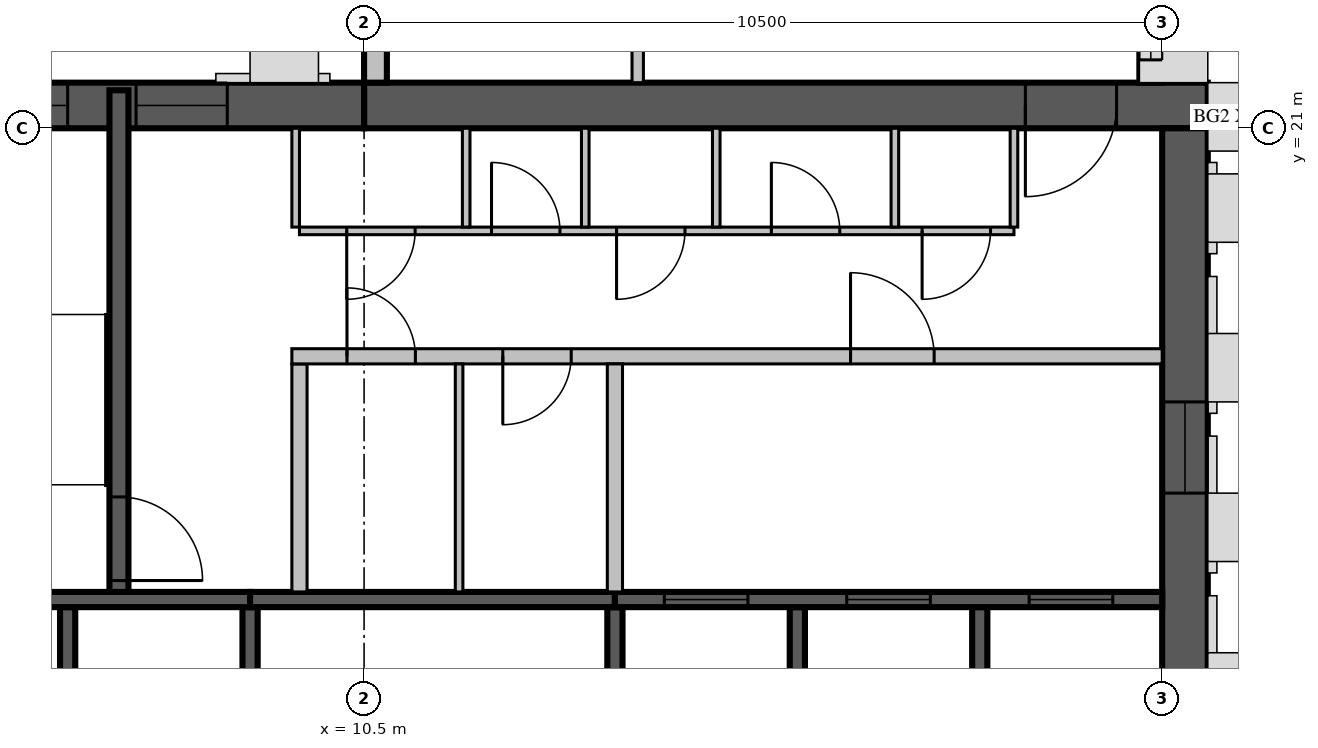
"""IFC4 building model, lengths in metres.
Left out: names, types, materials, properties, quantities, classifications, styles, units other than length and angle.
Written with IfcOpenShell. Run it as: python <this file> out.ifc"""

import sys

from ifc_helpers import new_model, si_unit, direction, frame, frame_2d, origin, place, context, subcontext, project, spatial, rectangle, extrude, source, transform, mapped, element, fill, save


model = new_model("IFC4")
c1 = context("Model", 3, precision=1e-05, world=origin(), true_north=direction((0.0, 1.0)))
c2 = subcontext(c1, "Body", "Model", "MODEL_VIEW")
j1 = project(units=[si_unit("LENGTHUNIT", "METRE"), si_unit("PLANEANGLEUNIT", "RADIAN")], contexts=[c1])
p1 = place(None, origin())
s1 = spatial("IfcSite", under=j1, at=p1, CompositionType="ELEMENT")
p2 = place(p1, origin())
s2 = spatial("IfcBuilding", under=s1, at=p2, CompositionType="ELEMENT")
p3 = place(p2, frame((0.0, 0.0, 302.0)))
s3 = spatial("IfcBuildingStorey", under=s2, at=p3, CompositionType="ELEMENT", Elevation=302.0)
m1 = source(origin(), c2, "Body", "SweptSolid", [
    extrude(rectangle(XDim=11.1, YDim=0.6, at=frame_2d((5.55, 0.0))), origin(), (0.0, 0.0, 1.0), 3.5),
])
p4 = place(p3, frame((10.5, 21.3, 0.0), z_axis=(0.0, 0.0, 1.0), x_axis=(1.0, 0.0, 0.0)))
e1 = element("IfcWall", 1, at=p4, inside=s3, PredefinedType="SHEAR", context=c2, shape_type="MappedRepresentation", body=[
    mapped(m1, transform((0.0, 0.0, 0.0), scale=1.0)),
])
m2 = source(origin(), c2, "Body", "SweptSolid", [
    extrude(rectangle(XDim=1.2, YDim=2.1, at=frame_2d((0.6, 1.05))), frame((0.0, 0.31, 0.0), z_axis=(0.0, -1.0, 0.0), x_axis=(1.0, 0.0, 0.0)), (0.0, 0.0, 1.0), 0.62),
])
p5 = place(p4, frame((8.7, 0.0, 0.0)))
e2 = element("IfcOpeningElement", 2, at=p5, cuts=e1, PredefinedType="OPENING", context=c2, shape_type="MappedRepresentation", body=[
    mapped(m2, transform((0.0, 0.0, 0.0), scale=1.0)),
])
m3 = source(origin(), c2, "Body", "SweptSolid", [
    extrude(rectangle(XDim=10.5, YDim=0.6, at=frame_2d((5.25, 0.0))), origin(), (0.0, 0.0, 1.0), 3.5),
])
p6 = place(p3, frame((21.3, 10.5, 0.0), z_axis=(0.0, 0.0, 1.0), x_axis=(0.0, 1.0, 0.0)))
e3 = element("IfcWall", 3, at=p6, inside=s3, PredefinedType="SHEAR", context=c2, shape_type="MappedRepresentation", body=[
    mapped(m3, transform((0.0, 0.0, 0.0), scale=1.0)),
])
m4 = source(origin(), c2, "Body", "SweptSolid", [
    extrude(rectangle(XDim=1.2, YDim=2.4, at=frame_2d((0.6, 1.2))), frame((0.0, 0.31, 0.0), z_axis=(0.0, -1.0, 0.0), x_axis=(1.0, 0.0, 0.0)), (0.0, 0.0, 1.0), 0.62),
])
p7 = place(p6, frame((5.7, 0.0, 0.6)))
e4 = element("IfcOpeningElement", 4, at=p7, cuts=e3, PredefinedType="OPENING", context=c2, shape_type="MappedRepresentation", body=[
    mapped(m4, transform((0.0, 0.0, 0.0), scale=1.0)),
])
m5 = source(origin(), c2, "Body", "SweptSolid", [
    extrude(rectangle(XDim=6.6, YDim=0.6, at=frame_2d((3.3, 0.0))), origin(), (0.0, 0.0, 1.0), 3.5),
])
p8 = place(p3, frame((3.9, 21.3, 0.0), z_axis=(0.0, 0.0, 1.0), x_axis=(1.0, 0.0, 0.0)))
e5 = element("IfcWall", 5, at=p8, inside=s3, PredefinedType="SHEAR", context=c2, shape_type="MappedRepresentation", body=[
    mapped(m5, transform((0.0, 0.0, 0.0), scale=1.0)),
])
p9 = place(p8, frame((1.5, 0.0, 0.6)))
e6 = element("IfcOpeningElement", 6, at=p9, cuts=e5, PredefinedType="OPENING", context=c2, shape_type="MappedRepresentation", body=[
    mapped(m4, transform((0.0, 0.0, 0.0), scale=1.0)),
])
p10 = place(p8, frame((3.6, 0.0, 0.6)))
e7 = element("IfcOpeningElement", 7, at=p10, cuts=e5, PredefinedType="OPENING", context=c2, shape_type="MappedRepresentation", body=[
    mapped(m4, transform((0.0, 0.0, 0.0), scale=1.0)),
])
m6 = source(origin(), c2, "Body", "SweptSolid", [
    extrude(rectangle(XDim=7.45, YDim=0.3, at=frame_2d((3.725, 0.0))), origin(), (0.0, 0.0, 1.0), 3.1),
])
p11 = place(p3, frame((20.85, 21.6, 0.0), z_axis=(0.0, 0.0, 1.0), x_axis=(0.0, 1.0, 0.0)))
e8 = element("IfcWall", 8, at=p11, inside=s3, PredefinedType="STANDARD", context=c2, shape_type="MappedRepresentation", body=[
    mapped(m6, transform((0.0, 0.0, 0.0), scale=1.0)),
])
m7 = source(origin(), c2, "Body", "SweptSolid", [
    extrude(rectangle(XDim=2.4, YDim=2.0, at=frame_2d((1.2, 1.0))), frame((0.0, 0.16, 0.0), z_axis=(0.0, -1.0, 0.0), x_axis=(1.0, 0.0, 0.0)), (0.0, 0.0, 1.0), 0.32),
])
p12 = place(p11, frame((0.3, 0.0, 0.6)))
e9 = element("IfcOpeningElement", 9, at=p12, cuts=e8, PredefinedType="OPENING", context=c2, shape_type="MappedRepresentation", body=[
    mapped(m7, transform((0.0, 0.0, 0.0), scale=1.0)),
])
m8 = source(origin(), c2, "Body", "SweptSolid", [
    extrude(rectangle(XDim=3.0, YDim=2.0, at=frame_2d((1.5, 1.0))), frame((0.0, 0.16, 0.0), z_axis=(0.0, -1.0, 0.0), x_axis=(1.0, 0.0, 0.0)), (0.0, 0.0, 1.0), 0.32),
])
p13 = place(p11, frame((4.2, 0.0, 0.6)))
e10 = element("IfcOpeningElement", 10, at=p13, cuts=e8, PredefinedType="OPENING", context=c2, shape_type="MappedRepresentation", body=[
    mapped(m8, transform((0.0, 0.0, 0.0), scale=1.0)),
])
m9 = source(origin(), c2, "Body", "SweptSolid", [
    extrude(rectangle(XDim=5.28, YDim=0.3, at=frame_2d((2.64, 0.0))), origin(), (0.0, 0.0, 1.0), 3.1),
])
p14 = place(p3, frame((10.65, 26.88, 0.0), z_axis=(0.0, 0.0, 1.0), x_axis=(0.0, -1.0, 0.0)))
e11 = element("IfcWall", 11, at=p14, inside=s3, PredefinedType="STANDARD", context=c2, shape_type="MappedRepresentation", body=[
    mapped(m9, transform((0.0, 0.0, 0.0), scale=1.0)),
])
m10 = source(origin(), c2, "Body", "SweptSolid", [
    extrude(rectangle(XDim=3.6, YDim=2.0, at=frame_2d((1.8, 1.0))), frame((0.0, 0.16, 0.0), z_axis=(0.0, -1.0, 0.0), x_axis=(1.0, 0.0, 0.0)), (0.0, 0.0, 1.0), 0.32),
])
p15 = place(p14, frame((1.14, 0.0, 0.6)))
e12 = element("IfcOpeningElement", 12, at=p15, cuts=e11, PredefinedType="OPENING", context=c2, shape_type="MappedRepresentation", body=[
    mapped(m10, transform((0.0, 0.0, 0.0), scale=1.0)),
])
m11 = source(origin(), c2, "Body", "SweptSolid", [
    extrude(rectangle(XDim=3.0, YDim=0.2, at=frame_2d((1.5, 0.0))), origin(), (0.0, 0.0, 1.0), 3.5),
])
p16 = place(p3, frame((6.6, 11.7, 0.0), z_axis=(0.0, 0.0, 1.0), x_axis=(0.0, 1.0, 0.0)))
e13 = element("IfcWall", 13, at=p16, inside=s3, PredefinedType="SOLIDWALL", context=c2, shape_type="MappedRepresentation", body=[
    mapped(m11, transform((0.0, 0.0, 0.0), scale=1.0)),
])
m12 = source(origin(), c2, "Body", "SweptSolid", [
    extrude(rectangle(XDim=3.0, YDim=0.2, at=frame_2d((1.5, 0.0))), origin(), (0.0, 0.0, 1.0), 3.1),
])
for number, where, z_axis, x_axis in (
    (14, (9.0, 11.7, 0.0), (0.0, 0.0, 1.0), (0.0, 1.0, 0.0)),
    (15, (13.8, 11.7, 0.0), (0.0, 0.0, 1.0), (0.0, 1.0, 0.0)),
):
    element("IfcWall", number, at=place(p3, frame(where, z_axis=z_axis, x_axis=x_axis)), inside=s3, PredefinedType="SOLIDWALL", context=c2, shape_type="MappedRepresentation", body=[
        mapped(m12, transform((0.0, 0.0, 0.0), scale=1.0)),
    ])
for number, where, z_axis, x_axis in (
    (16, (16.2, 11.7, 0.0), (0.0, 0.0, 1.0), (0.0, 1.0, 0.0)),
    (17, (18.6, 11.7, 0.0), (0.0, 0.0, 1.0), (0.0, 1.0, 0.0)),
):
    element("IfcWall", number, at=place(p3, frame(where, z_axis=z_axis, x_axis=x_axis)), inside=s3, PredefinedType="SOLIDWALL", context=c2, shape_type="MappedRepresentation", body=[
        mapped(m11, transform((0.0, 0.0, 0.0), scale=1.0)),
    ])
m13 = source(origin(), c2, "Body", "SweptSolid", [
    extrude(rectangle(XDim=4.8, YDim=0.2, at=frame_2d((2.4, 0.0))), origin(), (0.0, 0.0, 1.0), 3.5),
])
p17 = place(p3, frame((4.2, 14.8, 0.0), z_axis=(0.0, 0.0, 1.0), x_axis=(1.0, 0.0, 0.0)))
e18 = element("IfcWall", 18, at=p17, inside=s3, PredefinedType="SOLIDWALL", context=c2, shape_type="MappedRepresentation", body=[
    mapped(m13, transform((0.0, 0.0, 0.0), scale=1.0)),
])
m14 = source(origin(), c2, "Body", "SweptSolid", [
    extrude(rectangle(XDim=4.8, YDim=0.2, at=frame_2d((2.4, 0.0))), origin(), (0.0, 0.0, 1.0), 3.1),
])
p18 = place(p3, frame((9.0, 14.8, 0.0), z_axis=(0.0, 0.0, 1.0), x_axis=(1.0, 0.0, 0.0)))
e19 = element("IfcWall", 19, at=p18, inside=s3, PredefinedType="SOLIDWALL", context=c2, shape_type="MappedRepresentation", body=[
    mapped(m14, transform((0.0, 0.0, 0.0), scale=1.0)),
])
m15 = source(origin(), c2, "Body", "SweptSolid", [
    extrude(rectangle(XDim=7.2, YDim=0.2, at=frame_2d((3.6, 0.0))), origin(), (0.0, 0.0, 1.0), 3.5),
])
p19 = place(p3, frame((13.8, 14.8, 0.0), z_axis=(0.0, 0.0, 1.0), x_axis=(1.0, 0.0, 0.0)))
e20 = element("IfcWall", 20, at=p19, inside=s3, PredefinedType="SOLIDWALL", context=c2, shape_type="MappedRepresentation", body=[
    mapped(m15, transform((0.0, 0.0, 0.0), scale=1.0)),
])
m16 = source(origin(), c2, "Body", "SweptSolid", [
    extrude(rectangle(XDim=1.1, YDim=2.1, at=frame_2d((0.55, 1.05))), frame((0.0, 0.11, 0.0), z_axis=(0.0, -1.0, 0.0), x_axis=(1.0, 0.0, 0.0)), (0.0, 0.0, 1.0), 0.22),
])
p20 = place(p19, frame((0.65, 0.0, 0.0)))
e21 = element("IfcOpeningElement", 21, at=p20, cuts=e20, PredefinedType="OPENING", context=c2, shape_type="MappedRepresentation", body=[
    mapped(m16, transform((0.0, 0.0, 0.0), scale=1.0)),
])
p21 = place(p19, frame((3.05, 0.0, 0.0)))
e22 = element("IfcOpeningElement", 22, at=p21, cuts=e20, PredefinedType="OPENING", context=c2, shape_type="MappedRepresentation", body=[
    mapped(m16, transform((0.0, 0.0, 0.0), scale=1.0)),
])
p22 = place(p19, frame((5.45, 0.0, 0.0)))
e23 = element("IfcOpeningElement", 23, at=p22, cuts=e20, PredefinedType="OPENING", context=c2, shape_type="MappedRepresentation", body=[
    mapped(m16, transform((0.0, 0.0, 0.0), scale=1.0)),
])
m17 = source(origin(), c2, "Body", "SweptSolid", [
    extrude(rectangle(XDim=6.6, YDim=0.25, at=frame_2d((3.3, 0.0))), origin(), (0.0, 0.0, 1.0), 3.1),
])
p23 = place(p3, frame((7.275, 14.9, 0.0), z_axis=(0.0, 0.0, 1.0), x_axis=(0.0, 1.0, 0.0)))
e24 = element("IfcWall", 24, at=p23, inside=s3, PredefinedType="SOLIDWALL", context=c2, shape_type="MappedRepresentation", body=[
    mapped(m17, transform((0.0, 0.0, 0.0), scale=1.0)),
])
m18 = source(origin(), c2, "Body", "SweptSolid", [
    extrude(rectangle(XDim=1.1, YDim=2.1, at=frame_2d((0.55, 1.05))), frame((0.0, 0.135, 0.0), z_axis=(0.0, -1.0, 0.0), x_axis=(1.0, 0.0, 0.0)), (0.0, 0.0, 1.0), 0.27),
])
p24 = place(p23, frame((0.15, 0.0, 0.0)))
e25 = element("IfcOpeningElement", 25, at=p24, cuts=e24, PredefinedType="OPENING", context=c2, shape_type="MappedRepresentation", body=[
    mapped(m18, transform((0.0, 0.0, 0.0), scale=1.0)),
])
m19 = source(origin(), c2, "Body", "SweptSolid", [
    extrude(rectangle(XDim=3.0, YDim=0.2, at=frame_2d((1.5, 0.0))), origin(), (0.0, 0.0, 1.0), 3.1),
])
p25 = place(p3, frame((9.65, 14.9, 0.0), z_axis=(0.0, 0.0, 1.0), x_axis=(0.0, 1.0, 0.0)))
e26 = element("IfcWall", 26, at=p25, inside=s3, PredefinedType="PARTITIONING", context=c2, shape_type="MappedRepresentation", body=[
    mapped(m19, transform((0.0, 0.0, 0.0), scale=1.0)),
])
m20 = source(origin(), c2, "Body", "SweptSolid", [
    extrude(rectangle(XDim=11.45, YDim=0.2, at=frame_2d((5.725, 0.0))), origin(), (0.0, 0.0, 1.0), 3.1),
])
p26 = place(p3, frame((9.55, 18.0, 0.0), z_axis=(0.0, 0.0, 1.0), x_axis=(1.0, 0.0, 0.0)))
e27 = element("IfcWall", 27, at=p26, inside=s3, PredefinedType="PARTITIONING", context=c2, shape_type="MappedRepresentation", body=[
    mapped(m20, transform((0.0, 0.0, 0.0), scale=1.0)),
])
m21 = source(origin(), c2, "Body", "SweptSolid", [
    extrude(rectangle(XDim=0.9, YDim=2.1, at=frame_2d((0.45, 1.05))), frame((0.0, 0.11, 0.0), z_axis=(0.0, -1.0, 0.0), x_axis=(1.0, 0.0, 0.0)), (0.0, 0.0, 1.0), 0.22),
])
p27 = place(p26, frame((0.725, 0.0, 0.0)))
e28 = element("IfcOpeningElement", 28, at=p27, cuts=e27, PredefinedType="OPENING", context=c2, shape_type="MappedRepresentation", body=[
    mapped(m21, transform((0.0, 0.0, 0.0), scale=1.0)),
])
p28 = place(p26, frame((2.775, 0.0, 0.0)))
e29 = element("IfcOpeningElement", 29, at=p28, cuts=e27, PredefinedType="OPENING", context=c2, shape_type="MappedRepresentation", body=[
    mapped(m21, transform((0.0, 0.0, 0.0), scale=1.0)),
])
p29 = place(p26, frame((7.35, 0.0, 0.0)))
e30 = element("IfcOpeningElement", 30, at=p29, cuts=e27, PredefinedType="OPENING", context=c2, shape_type="MappedRepresentation", body=[
    mapped(m16, transform((0.0, 0.0, 0.0), scale=1.0)),
])
m22 = source(origin(), c2, "Body", "SweptSolid", [
    extrude(rectangle(XDim=9.4, YDim=0.1, at=frame_2d((4.7, 0.0))), origin(), (0.0, 0.0, 1.0), 3.1),
])
p30 = place(p3, frame((9.65, 19.65, 0.0), z_axis=(0.0, 0.0, 1.0), x_axis=(1.0, 0.0, 0.0)))
e31 = element("IfcWall", 31, at=p30, inside=s3, PredefinedType="PARTITIONING", context=c2, shape_type="MappedRepresentation", body=[
    mapped(m22, transform((0.0, 0.0, 0.0), scale=1.0)),
])
m23 = source(origin(), c2, "Body", "SweptSolid", [
    extrude(rectangle(XDim=0.9, YDim=2.1, at=frame_2d((0.45, 1.05))), frame((0.0, 0.06, 0.0), z_axis=(0.0, -1.0, 0.0), x_axis=(1.0, 0.0, 0.0)), (0.0, 0.0, 1.0), 0.12),
])
p31 = place(p30, frame((0.622, 0.0, 0.0)))
e32 = element("IfcOpeningElement", 32, at=p31, cuts=e31, PredefinedType="OPENING", context=c2, shape_type="MappedRepresentation", body=[
    mapped(m23, transform((0.0, 0.0, 0.0), scale=1.0)),
])
p32 = place(p30, frame((2.527, 0.0, 0.0)))
e33 = element("IfcOpeningElement", 33, at=p32, cuts=e31, PredefinedType="OPENING", context=c2, shape_type="MappedRepresentation", body=[
    mapped(m23, transform((0.0, 0.0, 0.0), scale=1.0)),
])
p33 = place(p30, frame((4.172, 0.0, 0.0)))
e34 = element("IfcOpeningElement", 34, at=p33, cuts=e31, PredefinedType="OPENING", context=c2, shape_type="MappedRepresentation", body=[
    mapped(m23, transform((0.0, 0.0, 0.0), scale=1.0)),
])
p34 = place(p30, frame((6.208, 0.0, 0.0)))
e35 = element("IfcOpeningElement", 35, at=p34, cuts=e31, PredefinedType="OPENING", context=c2, shape_type="MappedRepresentation", body=[
    mapped(m23, transform((0.0, 0.0, 0.0), scale=1.0)),
])
p35 = place(p30, frame((8.192, 0.0, 0.0)))
e36 = element("IfcOpeningElement", 36, at=p35, cuts=e31, PredefinedType="OPENING", context=c2, shape_type="MappedRepresentation", body=[
    mapped(m23, transform((0.0, 0.0, 0.0), scale=1.0)),
])
m24 = source(origin(), c2, "Body", "SweptSolid", [
    extrude(rectangle(XDim=1.3, YDim=0.1, at=frame_2d((0.65, 0.0))), origin(), (0.0, 0.0, 1.0), 3.1),
])
for number, where, z_axis, x_axis in (
    (37, (11.843, 19.7, 0.0), (0.0, 0.0, 1.0), (0.0, 1.0, 0.0)),
    (38, (13.41, 19.7, 0.0), (0.0, 0.0, 1.0), (0.0, 1.0, 0.0)),
    (39, (15.133, 19.7, 0.0), (0.0, 0.0, 1.0), (0.0, 1.0, 0.0)),
    (40, (17.483, 19.7, 0.0), (0.0, 0.0, 1.0), (0.0, 1.0, 0.0)),
    (41, (9.6, 19.7, 0.0), (0.0, 0.0, 1.0), (0.0, 1.0, 0.0)),
    (42, (19.05, 19.7, 0.0), (0.0, 0.0, 1.0), (0.0, 1.0, 0.0)),
):
    element("IfcWall", number, at=place(p3, frame(where, z_axis=z_axis, x_axis=x_axis)), inside=s3, PredefinedType="PARTITIONING", context=c2, shape_type="MappedRepresentation", body=[
        mapped(m24, transform((0.0, 0.0, 0.0), scale=1.0)),
    ])
p36 = place(p3, frame((13.8, 14.9, 0.0), z_axis=(0.0, 0.0, 1.0), x_axis=(0.0, 1.0, 0.0)))
e43 = element("IfcWall", 43, at=p36, inside=s3, PredefinedType="PARTITIONING", context=c2, shape_type="MappedRepresentation", body=[
    mapped(m19, transform((0.0, 0.0, 0.0), scale=1.0)),
])
m25 = source(origin(), c2, "Body", "SweptSolid", [
    extrude(rectangle(XDim=3.0, YDim=0.1, at=frame_2d((1.5, 0.0))), origin(), (0.0, 0.0, 1.0), 3.1),
])
p37 = place(p3, frame((11.75, 14.9, 0.0), z_axis=(0.0, 0.0, 1.0), x_axis=(0.0, 1.0, 0.0)))
e44 = element("IfcWall", 44, at=p37, inside=s3, PredefinedType="PARTITIONING", context=c2, shape_type="MappedRepresentation", body=[
    mapped(m25, transform((0.0, 0.0, 0.0), scale=1.0)),
])
m26 = source(origin(), c2, "Body", "SweptSolid", [
    extrude(rectangle(XDim=7.725, YDim=0.15, at=frame_2d((3.862, 0.0))), origin(), (0.0, 0.0, 1.0), 3.1),
])
p38 = place(p3, frame((14.1, 29.325, 0.0), z_axis=(0.0, 0.0, 1.0), x_axis=(0.0, -1.0, 0.0)))
e45 = element("IfcWall", 45, at=p38, inside=s3, PredefinedType="PARTITIONING", context=c2, shape_type="MappedRepresentation", body=[
    mapped(m26, transform((0.0, 0.0, 0.0), scale=1.0)),
])
m27 = source(origin(), c2, "Body", "SweptSolid", [
    extrude(rectangle(XDim=1.0, YDim=2.1, at=frame_2d((0.5, 1.05))), frame((0.0, 0.085, 0.0), z_axis=(0.0, -1.0, 0.0), x_axis=(1.0, 0.0, 0.0)), (0.0, 0.0, 1.0), 0.17),
])
p39 = place(p38, frame((6.275, 0.0, 0.0)))
e46 = element("IfcOpeningElement", 46, at=p39, cuts=e45, PredefinedType="OPENING", context=c2, shape_type="MappedRepresentation", body=[
    mapped(m27, transform((0.0, 0.0, 0.0), scale=1.0)),
])
m28 = source(origin(), c2, "Body", "SweptSolid", [
    extrude(rectangle(XDim=2.4, YDim=2.0, at=frame_2d((1.2, 1.0))), frame((0.0, 0.03, 0.0), z_axis=(0.0, -1.0, 0.0), x_axis=(1.0, 0.0, 0.0)), (0.0, 0.0, 1.0), 0.06),
])
p40 = place(p12, origin())
e47 = element("IfcWindow", 47, at=p40, inside=s3, PartitioningType="SINGLE_PANEL", PredefinedType="WINDOW", context=c2, shape_type="MappedRepresentation", body=[
    mapped(m28, transform((0.0, 0.0, 0.0), scale=1.0)),
])
fill(e9, e47)
m29 = source(origin(), c2, "Body", "SweptSolid", [
    extrude(rectangle(XDim=1.1, YDim=2.1, at=frame_2d((0.55, 1.05))), frame((0.0, 0.025, 0.0), z_axis=(0.0, -1.0, 0.0), x_axis=(1.0, 0.0, 0.0)), (0.0, 0.0, 1.0), 0.05),
])
p41 = place(p20, origin())
e48 = element("IfcDoor", 48, at=p41, inside=s3, OperationType="SLIDING_TO_LEFT", PredefinedType="DOOR", context=c2, shape_type="MappedRepresentation", body=[
    mapped(m29, transform((0.0, 0.0, 0.0), scale=1.0)),
])
fill(e21, e48)
p42 = place(p21, origin())
e49 = element("IfcDoor", 49, at=p42, inside=s3, OperationType="SLIDING_TO_LEFT", PredefinedType="DOOR", context=c2, shape_type="MappedRepresentation", body=[
    mapped(m29, transform((0.0, 0.0, 0.0), scale=1.0)),
])
fill(e22, e49)
p43 = place(p22, origin())
e50 = element("IfcDoor", 50, at=p43, inside=s3, OperationType="SLIDING_TO_LEFT", PredefinedType="DOOR", context=c2, shape_type="MappedRepresentation", body=[
    mapped(m29, transform((0.0, 0.0, 0.0), scale=1.0)),
])
fill(e23, e50)
p44 = place(p24, origin())
e51 = element("IfcDoor", 51, at=p44, inside=s3, OperationType="SINGLE_SWING_RIGHT", PredefinedType="DOOR", context=c2, shape_type="MappedRepresentation", body=[
    mapped(m29, transform((0.0, 0.0, 0.0), scale=1.0)),
])
fill(e25, e51)
m30 = source(origin(), c2, "Body", "SweptSolid", [
    extrude(rectangle(XDim=0.9, YDim=2.1, at=frame_2d((0.45, 1.05))), frame((0.0, 0.025, 0.0), z_axis=(0.0, -1.0, 0.0), x_axis=(1.0, 0.0, 0.0)), (0.0, 0.0, 1.0), 0.05),
])
p45 = place(p27, origin())
e52 = element("IfcDoor", 52, at=p45, inside=s3, OperationType="SINGLE_SWING_LEFT", PredefinedType="DOOR", context=c2, shape_type="MappedRepresentation", body=[
    mapped(m30, transform((0.0, 0.0, 0.0), scale=1.0)),
])
fill(e28, e52)
p46 = place(p28, origin())
e53 = element("IfcDoor", 53, at=p46, inside=s3, OperationType="SINGLE_SWING_RIGHT", PredefinedType="DOOR", context=c2, shape_type="MappedRepresentation", body=[
    mapped(m30, transform((0.0, 0.0, 0.0), scale=1.0)),
])
fill(e29, e53)
p47 = place(p29, origin())
e54 = element("IfcDoor", 54, at=p47, inside=s3, OperationType="SINGLE_SWING_LEFT", PredefinedType="DOOR", context=c2, shape_type="MappedRepresentation", body=[
    mapped(m29, transform((0.0, 0.0, 0.0), scale=1.0)),
])
fill(e30, e54)
p48 = place(p31, origin())
e55 = element("IfcDoor", 55, at=p48, inside=s3, OperationType="SINGLE_SWING_RIGHT", PredefinedType="DOOR", context=c2, shape_type="MappedRepresentation", body=[
    mapped(m30, transform((0.0, 0.0, 0.0), scale=1.0)),
])
fill(e32, e55)
p49 = place(p32, origin())
e56 = element("IfcDoor", 56, at=p49, inside=s3, OperationType="SINGLE_SWING_LEFT", PredefinedType="DOOR", context=c2, shape_type="MappedRepresentation", body=[
    mapped(m30, transform((0.0, 0.0, 0.0), scale=1.0)),
])
fill(e33, e56)
p50 = place(p33, origin())
e57 = element("IfcDoor", 57, at=p50, inside=s3, OperationType="SINGLE_SWING_RIGHT", PredefinedType="DOOR", context=c2, shape_type="MappedRepresentation", body=[
    mapped(m30, transform((0.0, 0.0, 0.0), scale=1.0)),
])
fill(e34, e57)
p51 = place(p34, origin())
e58 = element("IfcDoor", 58, at=p51, inside=s3, OperationType="SINGLE_SWING_LEFT", PredefinedType="DOOR", context=c2, shape_type="MappedRepresentation", body=[
    mapped(m30, transform((0.0, 0.0, 0.0), scale=1.0)),
])
fill(e35, e58)
p52 = place(p35, origin())
e59 = element("IfcDoor", 59, at=p52, inside=s3, OperationType="SINGLE_SWING_RIGHT", PredefinedType="DOOR", context=c2, shape_type="MappedRepresentation", body=[
    mapped(m30, transform((0.0, 0.0, 0.0), scale=1.0)),
])
fill(e36, e59)
m31 = source(origin(), c2, "Body", "SweptSolid", [
    extrude(rectangle(XDim=1.2, YDim=2.1, at=frame_2d((0.6, 1.05))), frame((0.0, 0.025, 0.0), z_axis=(0.0, -1.0, 0.0), x_axis=(1.0, 0.0, 0.0)), (0.0, 0.0, 1.0), 0.05),
])
p53 = place(p5, origin())
e60 = element("IfcDoor", 60, at=p53, inside=s3, OperationType="SINGLE_SWING_RIGHT", PredefinedType="DOOR", context=c2, shape_type="MappedRepresentation", body=[
    mapped(m31, transform((0.0, 0.0, 0.0), scale=1.0)),
])
fill(e2, e60)
m32 = source(origin(), c2, "Body", "SweptSolid", [
    extrude(rectangle(XDim=1.2, YDim=2.4, at=frame_2d((0.6, 1.2))), frame((0.0, 0.03, 0.0), z_axis=(0.0, -1.0, 0.0), x_axis=(1.0, 0.0, 0.0)), (0.0, 0.0, 1.0), 0.06),
])
p54 = place(p7, origin())
e61 = element("IfcWindow", 61, at=p54, inside=s3, PartitioningType="SINGLE_PANEL", PredefinedType="WINDOW", context=c2, shape_type="MappedRepresentation", body=[
    mapped(m32, transform((0.0, 0.0, 0.0), scale=1.0)),
])
fill(e4, e61)
p55 = place(p9, origin())
e62 = element("IfcWindow", 62, at=p55, inside=s3, PartitioningType="SINGLE_PANEL", PredefinedType="WINDOW", context=c2, shape_type="MappedRepresentation", body=[
    mapped(m32, transform((0.0, 0.0, 0.0), scale=1.0)),
])
fill(e6, e62)
p56 = place(p10, origin())
e63 = element("IfcWindow", 63, at=p56, inside=s3, PartitioningType="SINGLE_PANEL", PredefinedType="WINDOW", context=c2, shape_type="MappedRepresentation", body=[
    mapped(m32, transform((0.0, 0.0, 0.0), scale=1.0)),
])
fill(e7, e63)
save(model, sys.argv[1])
